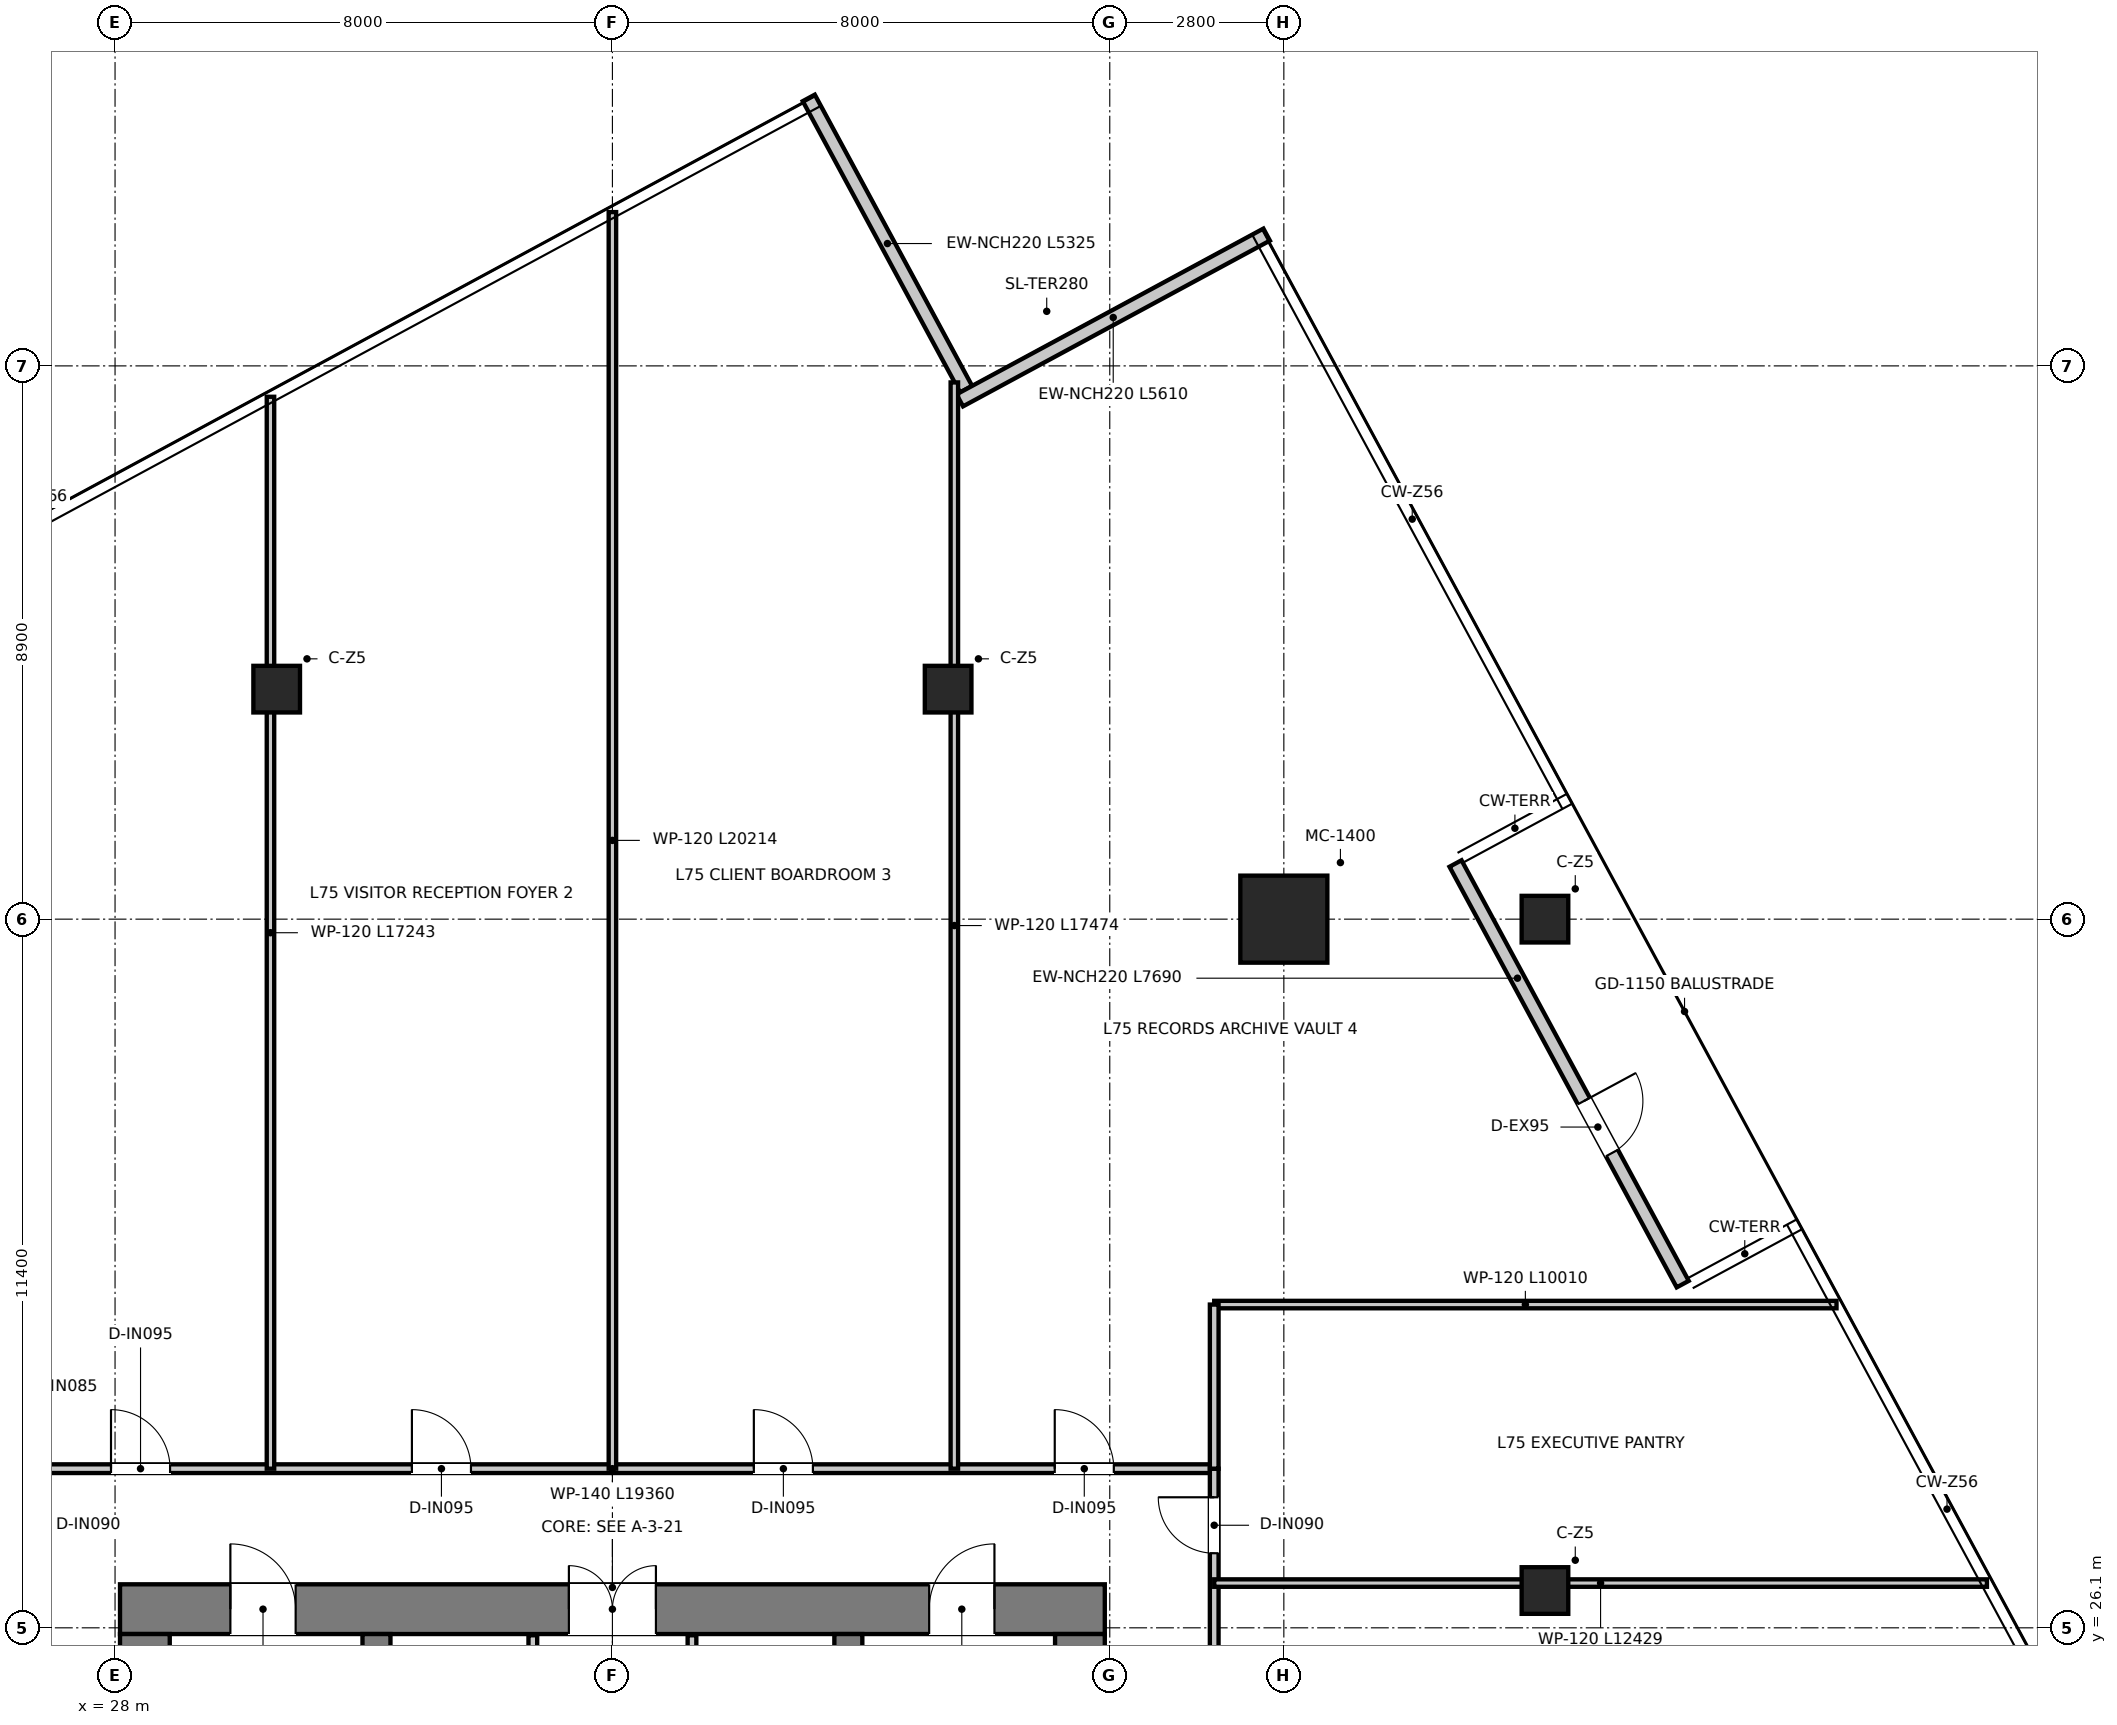
"""IFC4 building model, lengths in metres.
Left out: names, types, materials, properties, quantities, classifications, styles, units other than length and angle.
Written with IfcOpenShell. Run it as: python <this file> out.ifc"""

import sys

from ifc_helpers import new_model, si_unit, direction, frame, frame_2d, origin, origin_2d, place, context, subcontext, project, spatial, rectangle, extrude, source, transform, mapped, element, fill, save


model = new_model("IFC4")
c1 = context("Model", 3, precision=1e-05, world=origin(), true_north=direction((0.0, 1.0)))
c2 = subcontext(c1, "Body", "Model", "MODEL_VIEW")
j1 = project(units=[si_unit("LENGTHUNIT", "METRE"), si_unit("PLANEANGLEUNIT", "RADIAN")], contexts=[c1])
p1 = place(None, origin())
s1 = spatial("IfcSite", under=j1, at=p1, CompositionType="ELEMENT")
p2 = place(p1, origin())
s2 = spatial("IfcBuilding", under=s1, at=p2, CompositionType="ELEMENT")
p3 = place(p2, frame((0.0, 0.0, 306.9)))
s3 = spatial("IfcBuildingStorey", under=s2, at=p3, CompositionType="ELEMENT", Elevation=306.9)
p4 = place(p3, frame((28.08, 26.4, 0.0), z_axis=(0.0, 0.0, 1.0), x_axis=(1.0, 0.0, 0.0)))
e1 = element("IfcWall", 1, at=p4, inside=s3, PredefinedType="SHEAR", context=c2, shape_type="SweptSolid", body=[
    extrude(rectangle(XDim=15.84, YDim=0.8, at=frame_2d((7.92, 0.0))), origin(), (0.0, 0.0, 1.0), 3.95),
])
p5 = place(p4, frame((7.22, 0.0, 0.0)))
e2 = element("IfcOpeningElement", 2, at=p5, cuts=e1, PredefinedType="OPENING", context=c2, shape_type="SweptSolid", body=[
    extrude(rectangle(XDim=1.4, YDim=2.2, at=frame_2d((0.7, 1.1))), frame((0.0, 0.41, 0.0), z_axis=(0.0, -1.0, 0.0), x_axis=(1.0, 0.0, 0.0)), (0.0, 0.0, 1.0), 0.82),
])
p6 = place(p4, frame((1.775, 0.0, 0.0)))
e3 = element("IfcOpeningElement", 3, at=p6, cuts=e1, PredefinedType="OPENING", context=c2, shape_type="SweptSolid", body=[
    extrude(rectangle(XDim=1.05, YDim=2.1, at=frame_2d((0.525, 1.05))), frame((0.0, 0.41, 0.0), z_axis=(0.0, -1.0, 0.0), x_axis=(1.0, 0.0, 0.0)), (0.0, 0.0, 1.0), 0.82),
])
p7 = place(p4, frame((13.015, 0.0, 0.0)))
e4 = element("IfcOpeningElement", 4, at=p7, cuts=e1, PredefinedType="OPENING", context=c2, shape_type="SweptSolid", body=[
    extrude(rectangle(XDim=1.05, YDim=2.1, at=frame_2d((0.525, 1.05))), frame((0.0, 0.41, 0.0), z_axis=(0.0, -1.0, 0.0), x_axis=(1.0, 0.0, 0.0)), (0.0, 0.0, 1.0), 0.82),
])
for number, where, z_axis, x_axis in (
    (5, (28.48, 11.3, 0.0), (0.0, 0.0, 1.0), (0.0, 1.0, 0.0)),
    (6, (43.52, 11.3, 0.0), (0.0, 0.0, 1.0), (0.0, 1.0, 0.0)),
):
    element("IfcWall", number, at=place(p3, frame(where, z_axis=z_axis, x_axis=x_axis)), inside=s3, PredefinedType="SHEAR", context=c2, shape_type="SweptSolid", body=[
        extrude(rectangle(XDim=14.7, YDim=0.8, at=frame_2d((7.35, 0.0))), origin(), (0.0, 0.0, 1.0), 3.95),
    ])
p8 = place(p3, frame((32.205, 13.22, 0.0), z_axis=(0.0, 0.0, 1.0), x_axis=(0.0, 1.0, 0.0)))
e7 = element("IfcWall", 7, at=p8, inside=s3, PredefinedType="SHEAR", context=c2, shape_type="SweptSolid", body=[
    extrude(rectangle(XDim=12.78, YDim=0.45, at=frame_2d((6.39, 0.0))), origin(), (0.0, 0.0, 1.0), 3.95),
])
p9 = place(p8, frame((10.58, 0.0, 0.0)))
e8 = element("IfcOpeningElement", 8, at=p9, cuts=e7, PredefinedType="OPENING", context=c2, shape_type="SweptSolid", body=[
    extrude(rectangle(XDim=1.1, YDim=2.15, at=frame_2d((0.55, 1.075))), frame((0.0, 0.235, 0.0), z_axis=(0.0, -1.0, 0.0), x_axis=(1.0, 0.0, 0.0)), (0.0, 0.0, 1.0), 0.47),
])
p10 = place(p3, frame((39.795, 13.22, 0.0), z_axis=(0.0, 0.0, 1.0), x_axis=(0.0, 1.0, 0.0)))
e9 = element("IfcWall", 9, at=p10, inside=s3, PredefinedType="SHEAR", context=c2, shape_type="SweptSolid", body=[
    extrude(rectangle(XDim=12.78, YDim=0.45, at=frame_2d((6.39, 0.0))), origin(), (0.0, 0.0, 1.0), 3.95),
])
p11 = place(p10, frame((10.58, 0.0, 0.0)))
e10 = element("IfcOpeningElement", 10, at=p11, cuts=e9, PredefinedType="OPENING", context=c2, shape_type="SweptSolid", body=[
    extrude(rectangle(XDim=1.1, YDim=2.15, at=frame_2d((0.55, 1.075))), frame((0.0, 0.235, 0.0), z_axis=(0.0, -1.0, 0.0), x_axis=(1.0, 0.0, 0.0)), (0.0, 0.0, 1.0), 0.47),
])
m1 = source(origin(), c2, "Body", "SweptSolid", [
    extrude(rectangle(XDim=1.4, YDim=1.4, at=origin_2d()), origin(), (0.0, 0.0, 1.0), 3.95),
])
p12 = place(p3, frame((46.8, 37.5, 0.0), z_axis=(0.0, 0.0, 1.0), x_axis=(1.0, 0.0, 0.0)))
e11 = element("IfcColumn", 11, at=p12, inside=s3, PredefinedType="USERDEFINED", context=c2, shape_type="MappedRepresentation", body=[
    mapped(m1, transform((0.0, 0.0, 0.0), x_axis=(1.0, 0.0, 0.0), y_axis=(0.0, 1.0, 0.0), z_axis=(0.0, 0.0, 1.0), scale=1.0)),
])
m2 = source(origin(), c2, "Body", "SweptSolid", [
    extrude(rectangle(XDim=0.75, YDim=0.75, at=origin_2d()), origin(), (0.0, 0.0, 1.0), 3.95),
])
for number, where, z_axis, x_axis in (
    (12, (30.6, 41.2, 0.0), (0.0, 0.0, 1.0), (1.0, 0.0, 0.0)),
    (13, (41.4, 41.2, 0.0), (0.0, 0.0, 1.0), (1.0, 0.0, 0.0)),
    (14, (51.0, 37.5, 0.0), (0.0, 0.0, 1.0), (1.0, 0.0, 0.0)),
    (15, (51.0, 26.7, 0.0), (0.0, 0.0, 1.0), (1.0, 0.0, 0.0)),
):
    element("IfcColumn", number, at=place(p3, frame(where, z_axis=z_axis, x_axis=x_axis)), inside=s3, PredefinedType="COLUMN", context=c2, shape_type="MappedRepresentation", body=[
        mapped(m2, transform((0.0, 0.0, 0.0), x_axis=(1.0, 0.0, 0.0), y_axis=(0.0, 1.0, 0.0), z_axis=(0.0, 0.0, 1.0), scale=1.0)),
    ])
p13 = place(p3, frame((41.689, 46.026, 0.0), z_axis=(0.0, 0.0, 1.0), x_axis=(-0.475250431035, 0.879850571291, 0.0)))
e16 = element("IfcWall", 16, at=p13, inside=s3, PredefinedType="ELEMENTEDWALL", context=c2, shape_type="SweptSolid", body=[
    extrude(rectangle(XDim=5.325, YDim=0.22, at=frame_2d((2.663, 0.0))), origin(), (0.0, 0.0, 1.0), 3.67),
])
p14 = place(p3, frame((49.561, 38.395, 0.0), z_axis=(0.0, 0.0, 1.0), x_axis=(0.475258045718, -0.879846458185, 0.0)))
e17 = element("IfcWall", 17, at=p14, inside=s3, PredefinedType="ELEMENTEDWALL", context=c2, shape_type="SweptSolid", body=[
    extrude(rectangle(XDim=7.69, YDim=0.22, at=frame_2d((3.845, 0.0))), origin(), (0.0, 0.0, 1.0), 3.18),
])
p15 = place(p14, frame((4.343, 0.0, 0.0)))
e18 = element("IfcOpeningElement", 18, at=p15, cuts=e17, PredefinedType="OPENING", context=c2, shape_type="SweptSolid", body=[
    extrude(rectangle(XDim=0.95, YDim=2.1, at=frame_2d((0.475, 1.05))), frame((0.0, 0.12, 0.0), z_axis=(0.0, -1.0, 0.0), x_axis=(1.0, 0.0, 0.0)), (0.0, 0.0, 1.0), 0.24),
])
p16 = place(p3, frame((46.523, 48.512, 0.0), z_axis=(0.0, 0.0, 1.0), x_axis=(-0.879863910566, -0.475225734661, 0.0)))
e19 = element("IfcWall", 19, at=p16, inside=s3, PredefinedType="ELEMENTEDWALL", context=c2, shape_type="SweptSolid", body=[
    extrude(rectangle(XDim=5.61, YDim=0.22, at=frame_2d((2.805, 0.0))), origin(), (0.0, 0.0, 1.0), 3.67),
])
p17 = place(p3, frame((34.72, 20.2, 0.0), z_axis=(0.0, 0.0, 1.0), x_axis=(0.0, 1.0, 0.0)))
e20 = element("IfcWall", 20, at=p17, inside=s3, PredefinedType="PARTITIONING", context=c2, shape_type="SweptSolid", body=[
    extrude(rectangle(XDim=5.78, YDim=0.14, at=frame_2d((2.89, 0.0))), origin(), (0.0, 0.0, 1.0), 2.82),
])
p18 = place(p17, frame((1.05, 0.0, 0.0)))
e21 = element("IfcOpeningElement", 21, at=p18, cuts=e20, PredefinedType="OPENING", context=c2, shape_type="SweptSolid", body=[
    extrude(rectangle(XDim=0.9, YDim=2.1, at=frame_2d((0.45, 1.05))), frame((0.0, 0.08, 0.0), z_axis=(0.0, -1.0, 0.0), x_axis=(1.0, 0.0, 0.0)), (0.0, 0.0, 1.0), 0.16),
])
p19 = place(p3, frame((37.28, 20.2, 0.0), z_axis=(0.0, 0.0, 1.0), x_axis=(0.0, 1.0, 0.0)))
e22 = element("IfcWall", 22, at=p19, inside=s3, PredefinedType="PARTITIONING", context=c2, shape_type="SweptSolid", body=[
    extrude(rectangle(XDim=5.78, YDim=0.14, at=frame_2d((2.89, 0.0))), origin(), (0.0, 0.0, 1.0), 2.82),
])
p20 = place(p19, frame((0.95, 0.0, 0.0)))
e23 = element("IfcOpeningElement", 23, at=p20, cuts=e22, PredefinedType="OPENING", context=c2, shape_type="SweptSolid", body=[
    extrude(rectangle(XDim=1.1, YDim=2.15, at=frame_2d((0.55, 1.075))), frame((0.0, 0.08, 0.0), z_axis=(0.0, -1.0, 0.0), x_axis=(1.0, 0.0, 0.0)), (0.0, 0.0, 1.0), 0.16),
])
p21 = place(p3, frame((26.32, 28.66, 0.0), z_axis=(0.0, 0.0, 1.0), x_axis=(1.0, 0.0, 0.0)))
e24 = element("IfcWall", 24, at=p21, inside=s3, PredefinedType="PARTITIONING", context=c2, shape_type="SweptSolid", body=[
    extrude(rectangle(XDim=19.36, YDim=0.14, at=frame_2d((9.68, 0.0))), origin(), (0.0, 0.0, 1.0), 3.18),
])
p22 = place(p21, frame((1.615, 0.0, 0.0)))
e25 = element("IfcOpeningElement", 25, at=p22, cuts=e24, PredefinedType="OPENING", context=c2, shape_type="SweptSolid", body=[
    extrude(rectangle(XDim=0.95, YDim=2.1, at=frame_2d((0.475, 1.05))), frame((0.0, 0.08, 0.0), z_axis=(0.0, -1.0, 0.0), x_axis=(1.0, 0.0, 0.0)), (0.0, 0.0, 1.0), 0.16),
])
p23 = place(p21, frame((6.455, 0.0, 0.0)))
e26 = element("IfcOpeningElement", 26, at=p23, cuts=e24, PredefinedType="OPENING", context=c2, shape_type="SweptSolid", body=[
    extrude(rectangle(XDim=0.95, YDim=2.1, at=frame_2d((0.475, 1.05))), frame((0.0, 0.08, 0.0), z_axis=(0.0, -1.0, 0.0), x_axis=(1.0, 0.0, 0.0)), (0.0, 0.0, 1.0), 0.16),
])
p24 = place(p21, frame((11.955, 0.0, 0.0)))
e27 = element("IfcOpeningElement", 27, at=p24, cuts=e24, PredefinedType="OPENING", context=c2, shape_type="SweptSolid", body=[
    extrude(rectangle(XDim=0.95, YDim=2.1, at=frame_2d((0.475, 1.05))), frame((0.0, 0.08, 0.0), z_axis=(0.0, -1.0, 0.0), x_axis=(1.0, 0.0, 0.0)), (0.0, 0.0, 1.0), 0.16),
])
p25 = place(p21, frame((16.795, 0.0, 0.0)))
e28 = element("IfcOpeningElement", 28, at=p25, cuts=e24, PredefinedType="OPENING", context=c2, shape_type="SweptSolid", body=[
    extrude(rectangle(XDim=0.95, YDim=2.1, at=frame_2d((0.475, 1.05))), frame((0.0, 0.08, 0.0), z_axis=(0.0, -1.0, 0.0), x_axis=(1.0, 0.0, 0.0)), (0.0, 0.0, 1.0), 0.16),
])
p26 = place(p3, frame((45.68, 9.754, 0.0), z_axis=(0.0, 0.0, 1.0), x_axis=(0.0, 1.0, 0.0)))
e29 = element("IfcWall", 29, at=p26, inside=s3, PredefinedType="PARTITIONING", context=c2, shape_type="SweptSolid", body=[
    extrude(rectangle(XDim=18.906, YDim=0.14, at=frame_2d((9.453, 0.0))), origin(), (0.0, 0.0, 1.0), 3.13),
])
p27 = place(p26, frame((17.546, 0.0, 0.0)))
e30 = element("IfcOpeningElement", 30, at=p27, cuts=e29, PredefinedType="OPENING", context=c2, shape_type="SweptSolid", body=[
    extrude(rectangle(XDim=0.9, YDim=2.1, at=frame_2d((0.45, 1.05))), frame((0.0, 0.08, 0.0), z_axis=(0.0, -1.0, 0.0), x_axis=(1.0, 0.0, 0.0)), (0.0, 0.0, 1.0), 0.16),
])
p28 = place(p26, frame((11.956, 0.0, 0.0)))
e31 = element("IfcOpeningElement", 31, at=p28, cuts=e29, PredefinedType="OPENING", context=c2, shape_type="SweptSolid", body=[
    extrude(rectangle(XDim=0.9, YDim=2.1, at=frame_2d((0.45, 1.05))), frame((0.0, 0.08, 0.0), z_axis=(0.0, -1.0, 0.0), x_axis=(1.0, 0.0, 0.0)), (0.0, 0.0, 1.0), 0.16),
])
p29 = place(p3, frame((45.68, 26.82, 0.0), z_axis=(0.0, 0.0, 1.0), x_axis=(1.0, 0.0, 0.0)))
e32 = element("IfcWall", 32, at=p29, inside=s3, PredefinedType="PARTITIONING", context=c2, shape_type="SweptSolid", body=[
    extrude(rectangle(XDim=12.429, YDim=0.12, at=frame_2d((6.215, 0.0))), origin(), (0.0, 0.0, 1.0), 3.13),
])
p30 = place(p3, frame((45.68, 31.3, 0.0), z_axis=(0.0, 0.0, 1.0), x_axis=(1.0, 0.0, 0.0)))
e33 = element("IfcWall", 33, at=p30, inside=s3, PredefinedType="PARTITIONING", context=c2, shape_type="SweptSolid", body=[
    extrude(rectangle(XDim=10.01, YDim=0.12, at=frame_2d((5.005, 0.0))), origin(), (0.0, 0.0, 1.0), 3.13),
])
p31 = place(p3, frame((45.68, 28.66, 0.0), z_axis=(0.0, 0.0, 1.0), x_axis=(0.0, 1.0, 0.0)))
e34 = element("IfcWall", 34, at=p31, inside=s3, PredefinedType="PARTITIONING", context=c2, shape_type="SweptSolid", body=[
    extrude(rectangle(XDim=2.64, YDim=0.14, at=frame_2d((1.32, 0.0))), origin(), (0.0, 0.0, 1.0), 3.43),
])
p32 = place(p3, frame((30.5, 28.66, 0.0), z_axis=(0.0, 0.0, 1.0), x_axis=(0.0, 1.0, 0.0)))
e35 = element("IfcWall", 35, at=p32, inside=s3, PredefinedType="PARTITIONING", context=c2, shape_type="SweptSolid", body=[
    extrude(rectangle(XDim=17.243, YDim=0.12, at=frame_2d((8.622, 0.0))), origin(), (0.0, 0.0, 1.0), 3.13),
])
p33 = place(p3, frame((36.0, 28.66, 0.0), z_axis=(0.0, 0.0, 1.0), x_axis=(0.0, 1.0, 0.0)))
e36 = element("IfcWall", 36, at=p33, inside=s3, PredefinedType="PARTITIONING", context=c2, shape_type="SweptSolid", body=[
    extrude(rectangle(XDim=20.214, YDim=0.12, at=frame_2d((10.107, 0.0))), origin(), (0.0, 0.0, 1.0), 3.13),
])
p34 = place(p3, frame((41.5, 28.66, 0.0), z_axis=(0.0, 0.0, 1.0), x_axis=(0.0, 1.0, 0.0)))
e37 = element("IfcWall", 37, at=p34, inside=s3, PredefinedType="PARTITIONING", context=c2, shape_type="SweptSolid", body=[
    extrude(rectangle(XDim=17.474, YDim=0.12, at=frame_2d((8.737, 0.0))), origin(), (0.0, 0.0, 1.0), 3.13),
])
p35 = place(p5, origin())
e38 = element("IfcDoor", 38, at=p35, inside=s3, OperationType="DOUBLE_DOOR_SINGLE_SWING", PredefinedType="DOOR", context=c2, shape_type="SweptSolid", body=[
    extrude(rectangle(XDim=1.4, YDim=2.2, at=frame_2d((0.7, 1.1))), frame((0.0, 0.025, 0.0), z_axis=(0.0, -1.0, 0.0), x_axis=(1.0, 0.0, 0.0)), (0.0, 0.0, 1.0), 0.05),
])
fill(e2, e38)
p36 = place(p6, origin())
e39 = element("IfcDoor", 39, at=p36, inside=s3, OperationType="SINGLE_SWING_LEFT", PredefinedType="DOOR", context=c2, shape_type="SweptSolid", body=[
    extrude(rectangle(XDim=1.05, YDim=2.1, at=frame_2d((0.525, 1.05))), frame((0.0, 0.025, 0.0), z_axis=(0.0, -1.0, 0.0), x_axis=(1.0, 0.0, 0.0)), (0.0, 0.0, 1.0), 0.05),
])
fill(e3, e39)
p37 = place(p7, origin())
e40 = element("IfcDoor", 40, at=p37, inside=s3, OperationType="SINGLE_SWING_RIGHT", PredefinedType="DOOR", context=c2, shape_type="SweptSolid", body=[
    extrude(rectangle(XDim=1.05, YDim=2.1, at=frame_2d((0.525, 1.05))), frame((0.0, 0.025, 0.0), z_axis=(0.0, -1.0, 0.0), x_axis=(1.0, 0.0, 0.0)), (0.0, 0.0, 1.0), 0.05),
])
fill(e4, e40)
p38 = place(p27, origin())
e41 = element("IfcDoor", 41, at=p38, inside=s3, OperationType="SINGLE_SWING_RIGHT", PredefinedType="DOOR", context=c2, shape_type="SweptSolid", body=[
    extrude(rectangle(XDim=0.9, YDim=2.1, at=frame_2d((0.45, 1.05))), frame((0.0, 0.025, 0.0), z_axis=(0.0, -1.0, 0.0), x_axis=(1.0, 0.0, 0.0)), (0.0, 0.0, 1.0), 0.05),
])
fill(e30, e41)
p39 = place(p22, origin())
e42 = element("IfcDoor", 42, at=p39, inside=s3, OperationType="SINGLE_SWING_LEFT", PredefinedType="DOOR", context=c2, shape_type="SweptSolid", body=[
    extrude(rectangle(XDim=0.95, YDim=2.1, at=frame_2d((0.475, 1.05))), frame((0.0, 0.025, 0.0), z_axis=(0.0, -1.0, 0.0), x_axis=(1.0, 0.0, 0.0)), (0.0, 0.0, 1.0), 0.05),
])
fill(e25, e42)
p40 = place(p23, origin())
e43 = element("IfcDoor", 43, at=p40, inside=s3, OperationType="SINGLE_SWING_LEFT", PredefinedType="DOOR", context=c2, shape_type="SweptSolid", body=[
    extrude(rectangle(XDim=0.95, YDim=2.1, at=frame_2d((0.475, 1.05))), frame((0.0, 0.025, 0.0), z_axis=(0.0, -1.0, 0.0), x_axis=(1.0, 0.0, 0.0)), (0.0, 0.0, 1.0), 0.05),
])
fill(e26, e43)
p41 = place(p24, origin())
e44 = element("IfcDoor", 44, at=p41, inside=s3, OperationType="SINGLE_SWING_LEFT", PredefinedType="DOOR", context=c2, shape_type="SweptSolid", body=[
    extrude(rectangle(XDim=0.95, YDim=2.1, at=frame_2d((0.475, 1.05))), frame((0.0, 0.025, 0.0), z_axis=(0.0, -1.0, 0.0), x_axis=(1.0, 0.0, 0.0)), (0.0, 0.0, 1.0), 0.05),
])
fill(e27, e44)
p42 = place(p25, origin())
e45 = element("IfcDoor", 45, at=p42, inside=s3, OperationType="SINGLE_SWING_LEFT", PredefinedType="DOOR", context=c2, shape_type="SweptSolid", body=[
    extrude(rectangle(XDim=0.95, YDim=2.1, at=frame_2d((0.475, 1.05))), frame((0.0, 0.025, 0.0), z_axis=(0.0, -1.0, 0.0), x_axis=(1.0, 0.0, 0.0)), (0.0, 0.0, 1.0), 0.05),
])
fill(e28, e45)
p43 = place(p15, origin())
e46 = element("IfcDoor", 46, at=p43, inside=s3, OperationType="SINGLE_SWING_LEFT", PredefinedType="DOOR", context=c2, shape_type="SweptSolid", body=[
    extrude(rectangle(XDim=0.95, YDim=2.1, at=frame_2d((0.475, 1.05))), frame((0.0, 0.025, 0.0), z_axis=(0.0, -1.0, 0.0), x_axis=(1.0, 0.0, 0.0)), (0.0, 0.0, 1.0), 0.05),
])
fill(e18, e46)
save(model, sys.argv[1])
